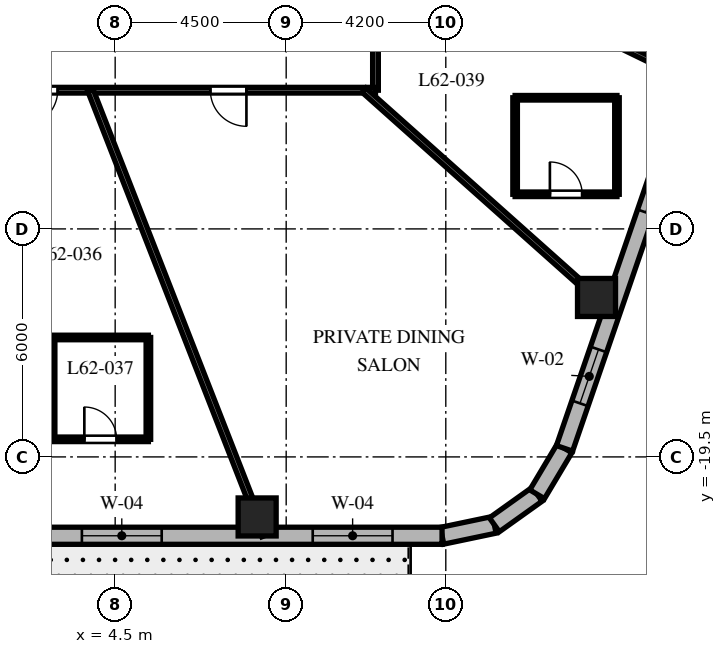
"""IFC4 building model, lengths in metres.
Left out: names, types, materials, properties, quantities, classifications, styles, units other than length and angle.
Written with IfcOpenShell. Run it as: python <this file> out.ifc"""

import sys

from ifc_helpers import new_model, si_unit, direction, frame, frame_2d, origin, origin_2d, place, context, subcontext, project, spatial, rectangle, extrude, element, fill, save


model = new_model("IFC4")
c1 = context("Model", 3, precision=1e-05, world=origin(), true_north=direction((0.0, 1.0)))
c2 = subcontext(c1, "Body", "Model", "MODEL_VIEW")
j1 = project(units=[si_unit("LENGTHUNIT", "METRE"), si_unit("PLANEANGLEUNIT", "RADIAN")], contexts=[c1])
p1 = place(None, origin())
s1 = spatial("IfcSite", under=j1, at=p1, CompositionType="ELEMENT")
p2 = place(p1, origin())
s2 = spatial("IfcBuilding", under=s1, at=p2, CompositionType="ELEMENT")
p3 = place(p2, frame((0.0, 0.0, 248.3)))
s3 = spatial("IfcBuildingStorey", under=s2, at=p3, CompositionType="ELEMENT", Elevation=248.3)
for number, where, z_axis, x_axis in (
    (1, (8.236, -21.08, 0.0), (0.0, 0.0, 1.0), (1.0, 0.0, 0.0)),
    (2, (17.166, -15.304, 0.0), (0.0, 0.0, 1.0), (1.0, 0.0, 0.0)),
):
    element("IfcColumn", number, at=place(p3, frame(where, z_axis=z_axis, x_axis=x_axis)), inside=s3, PredefinedType="COLUMN", context=c2, shape_type="SweptSolid", body=[
        extrude(rectangle(XDim=1.0, YDim=1.0, at=origin_2d()), origin(), (0.0, 0.0, 1.0), 3.8),
    ])
p4 = place(p3, frame((13.102, -21.575, 0.0), z_axis=(0.0, 0.0, 1.0), x_axis=(0.978757421505, 0.205021730188, 0.0)))
e3 = element("IfcWall", 3, at=p4, inside=s3, PredefinedType="SOLIDWALL", context=c2, shape_type="SweptSolid", body=[
    extrude(rectangle(XDim=1.406, YDim=0.45, at=frame_2d((0.703, 0.0))), origin(), (0.0, 0.0, 1.0), 3.5),
])
p5 = place(p3, frame((14.478, -21.287, 0.0), z_axis=(0.0, 0.0, 1.0), x_axis=(0.813888518617, 0.58102106611, 0.0)))
e4 = element("IfcWall", 4, at=p5, inside=s3, PredefinedType="SOLIDWALL", context=c2, shape_type="SweptSolid", body=[
    extrude(rectangle(XDim=1.383, YDim=0.45, at=frame_2d((0.691, 0.0))), origin(), (0.0, 0.0, 1.0), 3.5),
])
p6 = place(p3, frame((15.604, -20.483, 0.0), z_axis=(0.0, 0.0, 1.0), x_axis=(0.512222149036, 0.858852996756, 0.0)))
e5 = element("IfcWall", 5, at=p6, inside=s3, PredefinedType="SOLIDWALL", context=c2, shape_type="SweptSolid", body=[
    extrude(rectangle(XDim=1.406, YDim=0.45, at=frame_2d((0.703, 0.0))), origin(), (0.0, 0.0, 1.0), 3.5),
])
p7 = place(p3, frame((-11.298, -21.575, 0.0), z_axis=(0.0, 0.0, 1.0), x_axis=(1.0, 0.0, 0.0)))
e6 = element("IfcWall", 6, at=p7, inside=s3, PredefinedType="SOLIDWALL", context=c2, shape_type="SweptSolid", body=[
    extrude(rectangle(XDim=24.399, YDim=0.45, at=frame_2d((12.2, 0.0))), origin(), (0.0, 0.0, 1.0), 3.5),
])
p8 = place(p7, frame((2.55, 0.0, 0.0)))
e7 = element("IfcOpeningElement", 7, at=p8, cuts=e6, PredefinedType="OPENING", context=c2, shape_type="SweptSolid", body=[
    extrude(rectangle(XDim=1.0, YDim=2.15, at=frame_2d((0.5, 1.075))), frame((0.0, 0.235, 0.0), z_axis=(0.0, -1.0, 0.0), x_axis=(1.0, 0.0, 0.0)), (0.0, 0.0, 1.0), 0.47),
])
p9 = place(p7, frame((8.169, 0.0, 0.8)))
e8 = element("IfcOpeningElement", 8, at=p9, cuts=e6, PredefinedType="OPENING", context=c2, shape_type="SweptSolid", body=[
    extrude(rectangle(XDim=2.1, YDim=1.85, at=frame_2d((1.05, 0.925))), frame((0.0, 0.235, 0.0), z_axis=(0.0, -1.0, 0.0), x_axis=(1.0, 0.0, 0.0)), (0.0, 0.0, 1.0), 0.47),
])
p10 = place(p7, frame((14.922, 0.0, 0.8)))
e9 = element("IfcOpeningElement", 9, at=p10, cuts=e6, PredefinedType="OPENING", context=c2, shape_type="SweptSolid", body=[
    extrude(rectangle(XDim=2.1, YDim=1.85, at=frame_2d((1.05, 0.925))), frame((0.0, 0.235, 0.0), z_axis=(0.0, -1.0, 0.0), x_axis=(1.0, 0.0, 0.0)), (0.0, 0.0, 1.0), 0.47),
])
p11 = place(p7, frame((20.996, 0.0, 0.8)))
e10 = element("IfcOpeningElement", 10, at=p11, cuts=e6, PredefinedType="OPENING", context=c2, shape_type="SweptSolid", body=[
    extrude(rectangle(XDim=2.1, YDim=1.85, at=frame_2d((1.05, 0.925))), frame((0.0, 0.235, 0.0), z_axis=(0.0, -1.0, 0.0), x_axis=(1.0, 0.0, 0.0)), (0.0, 0.0, 1.0), 0.47),
])
p12 = place(p3, frame((16.324, -19.275, 0.0), z_axis=(0.0, 0.0, 1.0), x_axis=(0.325083142304, 0.945685439557, 0.0)))
e11 = element("IfcWall", 11, at=p12, inside=s3, PredefinedType="SOLIDWALL", context=c2, shape_type="SweptSolid", body=[
    extrude(rectangle(XDim=20.224, YDim=0.45, at=frame_2d((10.112, 0.0))), origin(), (0.0, 0.0, 1.0), 3.5),
])
p13 = place(p12, frame((1.253, 0.0, 0.8)))
e12 = element("IfcOpeningElement", 12, at=p13, cuts=e11, PredefinedType="OPENING", context=c2, shape_type="SweptSolid", body=[
    extrude(rectangle(XDim=1.5, YDim=1.8, at=frame_2d((0.75, 0.9))), frame((0.0, 0.235, 0.0), z_axis=(0.0, -1.0, 0.0), x_axis=(1.0, 0.0, 0.0)), (0.0, 0.0, 1.0), 0.47),
])
p14 = place(p12, frame((6.568, 0.0, 0.8)))
e13 = element("IfcOpeningElement", 13, at=p14, cuts=e11, PredefinedType="OPENING", context=c2, shape_type="SweptSolid", body=[
    extrude(rectangle(XDim=1.5, YDim=1.8, at=frame_2d((0.75, 0.9))), frame((0.0, 0.235, 0.0), z_axis=(0.0, -1.0, 0.0), x_axis=(1.0, 0.0, 0.0)), (0.0, 0.0, 1.0), 0.47),
])
p15 = place(p12, frame((12.25, 0.0, 0.8)))
e14 = element("IfcOpeningElement", 14, at=p15, cuts=e11, PredefinedType="OPENING", context=c2, shape_type="SweptSolid", body=[
    extrude(rectangle(XDim=1.5, YDim=1.8, at=frame_2d((0.75, 0.9))), frame((0.0, 0.235, 0.0), z_axis=(0.0, -1.0, 0.0), x_axis=(1.0, 0.0, 0.0)), (0.0, 0.0, 1.0), 0.47),
])
p16 = place(p12, frame((17.418, 0.0, 0.8)))
e15 = element("IfcOpeningElement", 15, at=p16, cuts=e11, PredefinedType="OPENING", context=c2, shape_type="SweptSolid", body=[
    extrude(rectangle(XDim=1.5, YDim=1.8, at=frame_2d((0.75, 0.9))), frame((0.0, 0.235, 0.0), z_axis=(0.0, -1.0, 0.0), x_axis=(1.0, 0.0, 0.0)), (0.0, 0.0, 1.0), 0.47),
])
p17 = place(p3, frame((11.35, -4.4, 0.0), z_axis=(0.0, 0.0, 1.0), x_axis=(0.0, -1.0, 0.0)))
e16 = element("IfcWall", 16, at=p17, inside=s3, PredefinedType="PARTITIONING", context=c2, shape_type="SweptSolid", body=[
    extrude(rectangle(XDim=5.45, YDim=0.15, at=frame_2d((2.725, 0.0))), origin(), (0.0, 0.0, 1.0), 2.99),
])
p18 = place(p17, frame((2.694, 0.0, 0.0)))
e17 = element("IfcOpeningElement", 17, at=p18, cuts=e16, PredefinedType="OPENING", context=c2, shape_type="SweptSolid", body=[
    extrude(rectangle(XDim=0.95, YDim=2.03, at=frame_2d((0.475, 1.015))), frame((0.0, 0.085, 0.0), z_axis=(0.0, -1.0, 0.0), x_axis=(1.0, 0.0, 0.0)), (0.0, 0.0, 1.0), 0.17),
])
p19 = place(p3, frame((11.35, -9.85, 0.0), z_axis=(0.0, 0.0, 1.0), x_axis=(-1.0, 0.0, 0.0)))
e18 = element("IfcWall", 18, at=p19, inside=s3, PredefinedType="PARTITIONING", context=c2, shape_type="SweptSolid", body=[
    extrude(rectangle(XDim=10.43, YDim=0.15, at=frame_2d((5.215, 0.0))), origin(), (0.0, 0.0, 1.0), 2.99),
])
p20 = place(p19, frame((8.362, 0.0, 0.0)))
e19 = element("IfcOpeningElement", 19, at=p20, cuts=e18, PredefinedType="OPENING", context=c2, shape_type="SweptSolid", body=[
    extrude(rectangle(XDim=0.95, YDim=2.03, at=frame_2d((0.475, 1.015))), frame((0.0, 0.085, 0.0), z_axis=(0.0, -1.0, 0.0), x_axis=(1.0, 0.0, 0.0)), (0.0, 0.0, 1.0), 0.17),
])
p21 = place(p19, frame((3.396, 0.0, 0.0)))
e20 = element("IfcOpeningElement", 20, at=p21, cuts=e18, PredefinedType="OPENING", context=c2, shape_type="SweptSolid", body=[
    extrude(rectangle(XDim=0.95, YDim=2.03, at=frame_2d((0.475, 1.015))), frame((0.0, 0.085, 0.0), z_axis=(0.0, -1.0, 0.0), x_axis=(1.0, 0.0, 0.0)), (0.0, 0.0, 1.0), 0.17),
])
p22 = place(p3, frame((3.848, -9.85, 0.0), z_axis=(0.0, 0.0, 1.0), x_axis=(0.363921778212, -0.931429513889, 0.0)))
e21 = element("IfcWall", 21, at=p22, inside=s3, PredefinedType="PARTITIONING", context=c2, shape_type="SweptSolid", body=[
    extrude(rectangle(XDim=12.588, YDim=0.15, at=frame_2d((6.294, 0.0))), origin(), (0.0, 0.0, 1.0), 2.74),
])
p23 = place(p3, frame((11.048, -9.85, 0.0), z_axis=(0.0, 0.0, 1.0), x_axis=(0.746444434655, -0.665447748492, 0.0)))
e22 = element("IfcWall", 22, at=p23, inside=s3, PredefinedType="PARTITIONING", context=c2, shape_type="SweptSolid", body=[
    extrude(rectangle(XDim=8.732, YDim=0.15, at=frame_2d((4.366, 0.0))), origin(), (0.0, 0.0, 1.0), 2.74),
])
p24 = place(p3, frame((11.35, -5.528, 0.0), z_axis=(0.0, 0.0, 1.0), x_axis=(0.899038669565, -0.437869239188, 0.0)))
e23 = element("IfcWall", 23, at=p24, inside=s3, PredefinedType="PARTITIONING", context=c2, shape_type="SweptSolid", body=[
    extrude(rectangle(XDim=9.242, YDim=0.15, at=frame_2d((4.621, 0.0))), origin(), (0.0, 0.0, 1.0), 2.74),
])
p25 = place(p3, frame((2.854, -19.037, 0.0), z_axis=(0.0, 0.0, 1.0), x_axis=(1.0, 0.0, 0.0)))
e24 = element("IfcWall", 24, at=p25, inside=s3, PredefinedType="PARTITIONING", context=c2, shape_type="SweptSolid", body=[
    extrude(rectangle(XDim=2.52, YDim=0.12, at=frame_2d((1.26, 0.0))), origin(), (0.0, 0.0, 1.0), 3.5),
])
p26 = place(p25, frame((0.835, 0.0, 0.0)))
e25 = element("IfcOpeningElement", 25, at=p26, cuts=e24, PredefinedType="OPENING", context=c2, shape_type="SweptSolid", body=[
    extrude(rectangle(XDim=0.85, YDim=2.03, at=frame_2d((0.425, 1.015))), frame((0.0, 0.07, 0.0), z_axis=(0.0, -1.0, 0.0), x_axis=(1.0, 0.0, 0.0)), (0.0, 0.0, 1.0), 0.14),
])
p27 = place(p3, frame((5.374, -19.037, 0.0), z_axis=(0.0, 0.0, 1.0), x_axis=(0.0, 1.0, 0.0)))
e26 = element("IfcWall", 26, at=p27, inside=s3, PredefinedType="PARTITIONING", context=c2, shape_type="SweptSolid", body=[
    extrude(rectangle(XDim=2.68, YDim=0.12, at=frame_2d((1.34, 0.0))), origin(), (0.0, 0.0, 1.0), 2.94),
])
p28 = place(p3, frame((5.374, -16.357, 0.0), z_axis=(0.0, 0.0, 1.0), x_axis=(-1.0, 0.0, 0.0)))
e27 = element("IfcWall", 27, at=p28, inside=s3, PredefinedType="PARTITIONING", context=c2, shape_type="SweptSolid", body=[
    extrude(rectangle(XDim=2.52, YDim=0.12, at=frame_2d((1.26, 0.0))), origin(), (0.0, 0.0, 1.0), 3.5),
])
p29 = place(p3, frame((2.854, -16.357, 0.0), z_axis=(0.0, 0.0, 1.0), x_axis=(0.0, -1.0, 0.0)))
e28 = element("IfcWall", 28, at=p29, inside=s3, PredefinedType="PARTITIONING", context=c2, shape_type="SweptSolid", body=[
    extrude(rectangle(XDim=2.68, YDim=0.12, at=frame_2d((1.34, 0.0))), origin(), (0.0, 0.0, 1.0), 2.94),
])
p30 = place(p3, frame((15.024, -12.589, 0.0), z_axis=(0.0, 0.0, 1.0), x_axis=(1.0, 0.0, 0.0)))
e29 = element("IfcWall", 29, at=p30, inside=s3, PredefinedType="PARTITIONING", context=c2, shape_type="SweptSolid", body=[
    extrude(rectangle(XDim=2.68, YDim=0.12, at=frame_2d((1.34, 0.0))), origin(), (0.0, 0.0, 1.0), 3.5),
])
p31 = place(p30, frame((0.915, 0.0, 0.0)))
e30 = element("IfcOpeningElement", 30, at=p31, cuts=e29, PredefinedType="OPENING", context=c2, shape_type="SweptSolid", body=[
    extrude(rectangle(XDim=0.85, YDim=2.03, at=frame_2d((0.425, 1.015))), frame((0.0, 0.07, 0.0), z_axis=(0.0, -1.0, 0.0), x_axis=(1.0, 0.0, 0.0)), (0.0, 0.0, 1.0), 0.14),
])
p32 = place(p3, frame((17.704, -12.589, 0.0), z_axis=(0.0, 0.0, 1.0), x_axis=(0.0, 1.0, 0.0)))
e31 = element("IfcWall", 31, at=p32, inside=s3, PredefinedType="PARTITIONING", context=c2, shape_type="SweptSolid", body=[
    extrude(rectangle(XDim=2.54, YDim=0.12, at=frame_2d((1.27, 0.0))), origin(), (0.0, 0.0, 1.0), 3.5),
])
p33 = place(p3, frame((17.704, -10.049, 0.0), z_axis=(0.0, 0.0, 1.0), x_axis=(-1.0, 0.0, 0.0)))
e32 = element("IfcWall", 32, at=p33, inside=s3, PredefinedType="PARTITIONING", context=c2, shape_type="SweptSolid", body=[
    extrude(rectangle(XDim=2.68, YDim=0.12, at=frame_2d((1.34, 0.0))), origin(), (0.0, 0.0, 1.0), 3.072),
])
p34 = place(p3, frame((15.024, -10.049, 0.0), z_axis=(0.0, 0.0, 1.0), x_axis=(0.0, -1.0, 0.0)))
e33 = element("IfcWall", 33, at=p34, inside=s3, PredefinedType="PARTITIONING", context=c2, shape_type="SweptSolid", body=[
    extrude(rectangle(XDim=2.54, YDim=0.12, at=frame_2d((1.27, 0.0))), origin(), (0.0, 0.0, 1.0), 3.072),
])
p35 = place(p10, origin())
e34 = element("IfcWindow", 34, at=p35, inside=s3, PartitioningType="SINGLE_PANEL", PredefinedType="WINDOW", context=c2, shape_type="SweptSolid", body=[
    extrude(rectangle(XDim=2.1, YDim=1.85, at=frame_2d((1.05, 0.925))), frame((0.0, 0.03, 0.0), z_axis=(0.0, -1.0, 0.0), x_axis=(1.0, 0.0, 0.0)), (0.0, 0.0, 1.0), 0.06),
])
fill(e9, e34)
p36 = place(p11, origin())
e35 = element("IfcWindow", 35, at=p36, inside=s3, PartitioningType="SINGLE_PANEL", PredefinedType="WINDOW", context=c2, shape_type="SweptSolid", body=[
    extrude(rectangle(XDim=2.1, YDim=1.85, at=frame_2d((1.05, 0.925))), frame((0.0, 0.03, 0.0), z_axis=(0.0, -1.0, 0.0), x_axis=(1.0, 0.0, 0.0)), (0.0, 0.0, 1.0), 0.06),
])
fill(e10, e35)
p37 = place(p13, origin())
e36 = element("IfcWindow", 36, at=p37, inside=s3, PartitioningType="SINGLE_PANEL", PredefinedType="WINDOW", context=c2, shape_type="SweptSolid", body=[
    extrude(rectangle(XDim=1.5, YDim=1.8, at=frame_2d((0.75, 0.9))), frame((0.0, 0.03, 0.0), z_axis=(0.0, -1.0, 0.0), x_axis=(1.0, 0.0, 0.0)), (0.0, 0.0, 1.0), 0.06),
])
fill(e12, e36)
p38 = place(p14, origin())
e37 = element("IfcWindow", 37, at=p38, inside=s3, PartitioningType="SINGLE_PANEL", PredefinedType="WINDOW", context=c2, shape_type="SweptSolid", body=[
    extrude(rectangle(XDim=1.5, YDim=1.8, at=frame_2d((0.75, 0.9))), frame((0.0, 0.03, 0.0), z_axis=(0.0, -1.0, 0.0), x_axis=(1.0, 0.0, 0.0)), (0.0, 0.0, 1.0), 0.06),
])
fill(e13, e37)
p39 = place(p20, origin())
e38 = element("IfcDoor", 38, at=p39, inside=s3, OperationType="SINGLE_SWING_RIGHT", PredefinedType="DOOR", context=c2, shape_type="SweptSolid", body=[
    extrude(rectangle(XDim=0.95, YDim=2.03, at=frame_2d((0.475, 1.015))), frame((0.0, 0.025, 0.0), z_axis=(0.0, -1.0, 0.0), x_axis=(1.0, 0.0, 0.0)), (0.0, 0.0, 1.0), 0.05),
])
fill(e19, e38)
p40 = place(p26, origin())
e39 = element("IfcDoor", 39, at=p40, inside=s3, OperationType="SINGLE_SWING_LEFT", PredefinedType="DOOR", context=c2, shape_type="SweptSolid", body=[
    extrude(rectangle(XDim=0.85, YDim=2.03, at=frame_2d((0.425, 1.015))), frame((0.0, 0.025, 0.0), z_axis=(0.0, -1.0, 0.0), x_axis=(1.0, 0.0, 0.0)), (0.0, 0.0, 1.0), 0.05),
])
fill(e25, e39)
p41 = place(p21, origin())
e40 = element("IfcDoor", 40, at=p41, inside=s3, OperationType="SINGLE_SWING_LEFT", PredefinedType="DOOR", context=c2, shape_type="SweptSolid", body=[
    extrude(rectangle(XDim=0.95, YDim=2.03, at=frame_2d((0.475, 1.015))), frame((0.0, 0.025, 0.0), z_axis=(0.0, -1.0, 0.0), x_axis=(1.0, 0.0, 0.0)), (0.0, 0.0, 1.0), 0.05),
])
fill(e20, e40)
p42 = place(p31, origin())
e41 = element("IfcDoor", 41, at=p42, inside=s3, OperationType="SINGLE_SWING_LEFT", PredefinedType="DOOR", context=c2, shape_type="SweptSolid", body=[
    extrude(rectangle(XDim=0.85, YDim=2.03, at=frame_2d((0.425, 1.015))), frame((0.0, 0.025, 0.0), z_axis=(0.0, -1.0, 0.0), x_axis=(1.0, 0.0, 0.0)), (0.0, 0.0, 1.0), 0.05),
])
fill(e30, e41)
save(model, sys.argv[1])
